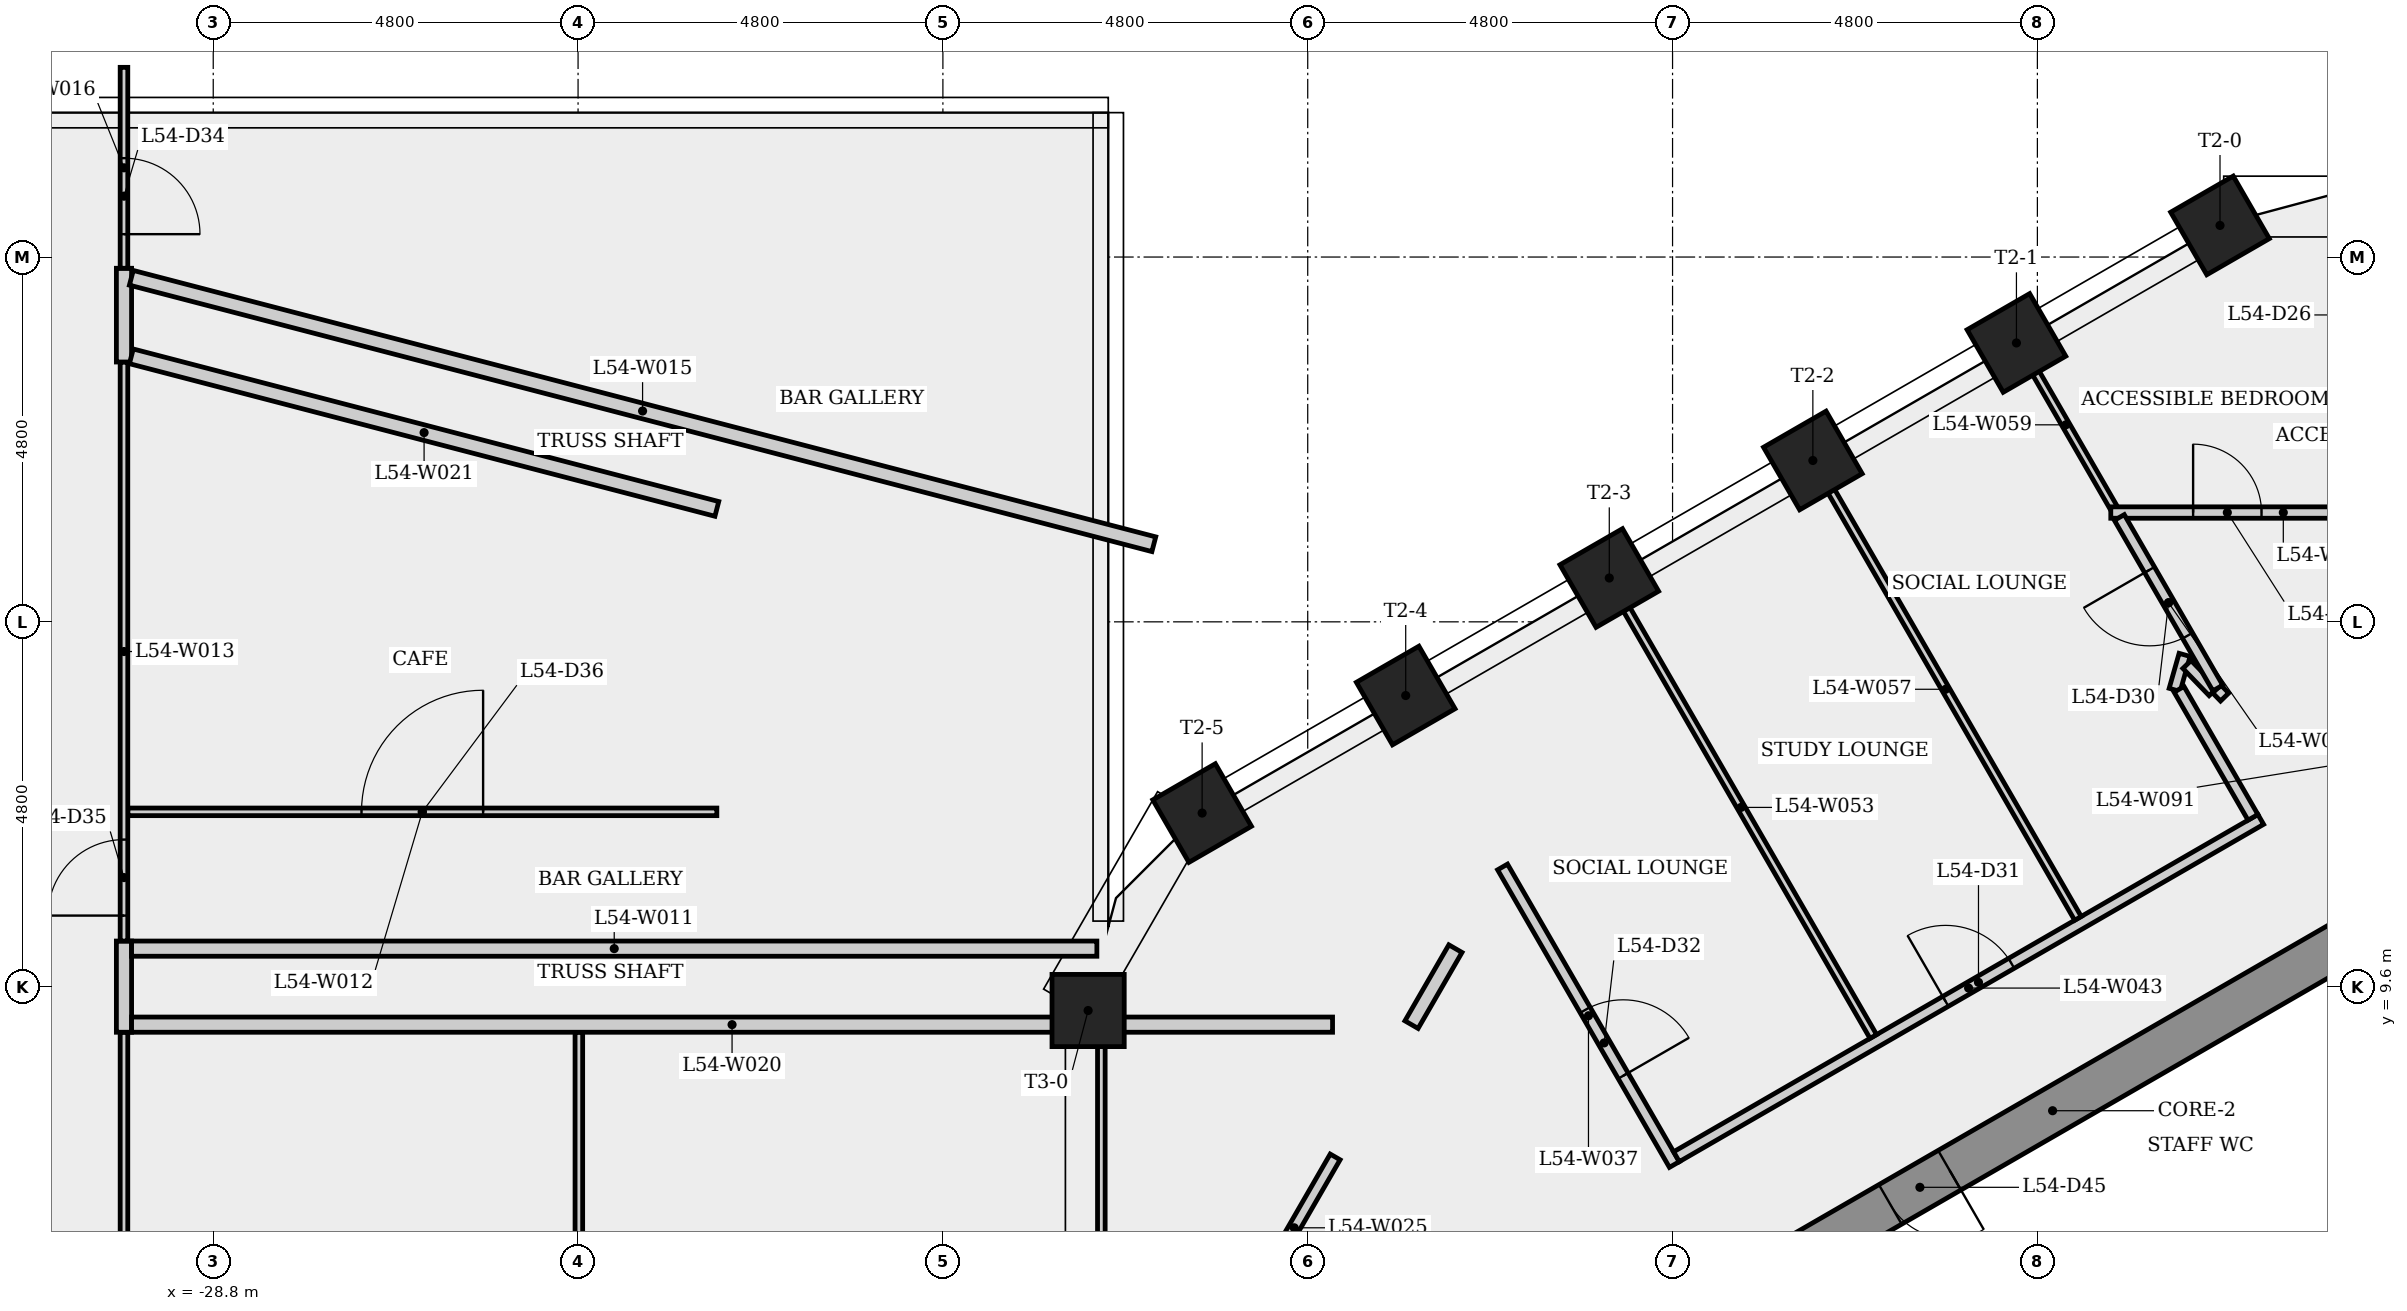
"""IFC4 building model, lengths in metres.
Left out: names, types, materials, properties, quantities, classifications, styles, units other than length and angle.
Written with IfcOpenShell. Run it as: python <this file> out.ifc"""

import sys

from ifc_helpers import new_model, si_unit, direction, frame, frame_2d, origin, origin_2d, place, context, subcontext, project, spatial, rectangle, extrude, element, fill, save


model = new_model("IFC4")
c1 = context("Model", 3, precision=1e-05, world=origin(), true_north=direction((0.0, 1.0)))
c2 = subcontext(c1, "Body", "Model", "MODEL_VIEW")
j1 = project(units=[si_unit("LENGTHUNIT", "METRE"), si_unit("PLANEANGLEUNIT", "RADIAN")], contexts=[c1])
p1 = place(None, origin())
s1 = spatial("IfcSite", under=j1, at=p1, CompositionType="ELEMENT")
p2 = place(p1, origin())
s2 = spatial("IfcBuilding", under=s1, at=p2, CompositionType="ELEMENT")
p3 = place(p2, frame((0.0, 0.0, 202.1)))
s3 = spatial("IfcBuildingStorey", under=s2, at=p3, CompositionType="ELEMENT", Elevation=202.1)
p4 = place(p3, frame((0.15, 10.71, 0.0), z_axis=(0.0, 0.0, 1.0), x_axis=(-0.866023993627, -0.500002442456, 0.0)))
e1 = element("IfcWall", 1, at=p4, inside=s3, PredefinedType="SHEAR", context=c2, shape_type="SweptSolid", body=[
    extrude(rectangle(XDim=10.97, YDim=0.6, at=frame_2d((5.485, 0.0))), origin(), (0.0, 0.0, 1.0), 4.0),
])
p5 = place(p4, frame((7.05, 0.0, 0.0)))
e2 = element("IfcOpeningElement", 2, at=p5, cuts=e1, PredefinedType="OPENING", context=c2, shape_type="SweptSolid", body=[
    extrude(rectangle(XDim=0.9, YDim=2.1, at=frame_2d((0.45, 1.05))), frame((0.0, 0.31, 0.0), z_axis=(0.0, -1.0, 0.0), x_axis=(1.0, 0.0, 0.0)), (0.0, 0.0, 1.0), 0.62),
])
for number, where, z_axis, x_axis in (
    (3, (-2.397, 19.616, 0.0), (0.0, 0.0, 1.0), (-0.5, 0.866, 0.0)),
    (4, (-5.076, 18.07, 0.0), (0.0, 0.0, 1.0), (-0.5, 0.866, 0.0)),
    (5, (-7.754, 16.523, 0.0), (0.0, 0.0, 1.0), (-0.5, 0.866, 0.0)),
    (6, (-10.432, 14.977, 0.0), (0.0, 0.0, 1.0), (-0.5, 0.866, 0.0)),
    (7, (-13.111, 13.43, 0.0), (0.0, 0.0, 1.0), (-0.5, 0.866, 0.0)),
    (8, (-15.789, 11.884, 0.0), (0.0, 0.0, 1.0), (-0.5, 0.866, 0.0)),
    (9, (-17.289, 9.286, 0.0), (0.0, 0.0, 1.0), (-1.0, 0.0, 0.0)),
):
    element("IfcColumn", number, at=place(p3, frame(where, z_axis=z_axis, x_axis=x_axis)), inside=s3, PredefinedType="COLUMN", context=c2, shape_type="SweptSolid", body=[
        extrude(rectangle(XDim=0.95, YDim=0.95, at=origin_2d()), origin(), (0.0, 0.0, 1.0), 4.0),
    ])
p6 = place(p3, frame((-29.974, -4.8, 0.0), z_axis=(0.0, 0.0, 1.0), x_axis=(0.0, 1.0, 0.0)))
e10 = element("IfcWall", 10, at=p6, inside=s3, PredefinedType="PARTITIONING", context=c2, shape_type="SweptSolid", body=[
    extrude(rectangle(XDim=13.8, YDim=0.1, at=frame_2d((6.9, 0.0))), origin(), (0.0, 0.0, 1.0), 3.6),
])
p7 = place(p6, frame((0.335, 0.0, 0.0)))
e11 = element("IfcOpeningElement", 11, at=p7, cuts=e10, PredefinedType="OPENING", context=c2, shape_type="SweptSolid", body=[
    extrude(rectangle(XDim=1.0, YDim=2.1, at=frame_2d((0.5, 1.05))), frame((0.0, 0.06, 0.0), z_axis=(0.0, -1.0, 0.0), x_axis=(1.0, 0.0, 0.0)), (0.0, 0.0, 1.0), 0.12),
])
p8 = place(p6, frame((6.965, 0.0, 0.0)))
e12 = element("IfcOpeningElement", 12, at=p8, cuts=e10, PredefinedType="OPENING", context=c2, shape_type="SweptSolid", body=[
    extrude(rectangle(XDim=1.6, YDim=2.1, at=frame_2d((0.8, 1.05))), frame((0.0, 0.06, 0.0), z_axis=(0.0, -1.0, 0.0), x_axis=(1.0, 0.0, 0.0)), (0.0, 0.0, 1.0), 0.12),
])
p9 = place(p3, frame((-29.974, 9.0, 0.0), z_axis=(0.0, 0.0, 1.0), x_axis=(0.0, 1.0, 0.0)))
e13 = element("IfcWall", 13, at=p9, inside=s3, PredefinedType="PLUMBINGWALL", context=c2, shape_type="SweptSolid", body=[
    extrude(rectangle(XDim=1.2, YDim=0.2, at=frame_2d((0.6, 0.0))), origin(), (0.0, 0.0, 1.0), 3.6),
])
p10 = place(p3, frame((-29.874, 10.1, 0.0), z_axis=(0.0, 0.0, 1.0), x_axis=(1.0, 0.0, 0.0)))
e14 = element("IfcWall", 14, at=p10, inside=s3, PredefinedType="PLUMBINGWALL", context=c2, shape_type="SweptSolid", body=[
    extrude(rectangle(XDim=12.7, YDim=0.2, at=frame_2d((6.35, 0.0))), origin(), (0.0, 0.0, 1.0), 3.6),
])
p11 = place(p3, frame((-29.924, 11.9, 0.0), z_axis=(0.0, 0.0, 1.0), x_axis=(1.0, 0.0, 0.0)))
e15 = element("IfcWall", 15, at=p11, inside=s3, PredefinedType="PARTITIONING", context=c2, shape_type="SweptSolid", body=[
    extrude(rectangle(XDim=7.75, YDim=0.1, at=frame_2d((3.875, 0.0))), origin(), (0.0, 0.0, 1.0), 3.6),
])
p12 = place(p11, frame((3.075, 0.0, 0.0)))
e16 = element("IfcOpeningElement", 16, at=p12, cuts=e15, PredefinedType="OPENING", context=c2, shape_type="SweptSolid", body=[
    extrude(rectangle(XDim=1.6, YDim=2.1, at=frame_2d((0.8, 1.05))), frame((0.0, 0.06, 0.0), z_axis=(0.0, -1.0, 0.0), x_axis=(1.0, 0.0, 0.0)), (0.0, 0.0, 1.0), 0.12),
])
p13 = place(p3, frame((-29.974, 10.2, 0.0), z_axis=(0.0, 0.0, 1.0), x_axis=(0.0, 1.0, 0.0)))
e17 = element("IfcWall", 17, at=p13, inside=s3, PredefinedType="PARTITIONING", context=c2, shape_type="SweptSolid", body=[
    extrude(rectangle(XDim=7.619, YDim=0.1, at=frame_2d((3.81, 0.0))), origin(), (0.0, 0.0, 1.0), 3.6),
])
p14 = place(p13, frame((0.335, 0.0, 0.0)))
e18 = element("IfcOpeningElement", 18, at=p14, cuts=e17, PredefinedType="OPENING", context=c2, shape_type="SweptSolid", body=[
    extrude(rectangle(XDim=1.0, YDim=2.1, at=frame_2d((0.5, 1.05))), frame((0.0, 0.06, 0.0), z_axis=(0.0, -1.0, 0.0), x_axis=(1.0, 0.0, 0.0)), (0.0, 0.0, 1.0), 0.12),
])
p15 = place(p3, frame((-29.974, 17.819, 0.0), z_axis=(0.0, 0.0, 1.0), x_axis=(0.0, 1.0, 0.0)))
e19 = element("IfcWall", 19, at=p15, inside=s3, PredefinedType="PLUMBINGWALL", context=c2, shape_type="SweptSolid", body=[
    extrude(rectangle(XDim=1.233, YDim=0.2, at=frame_2d((0.617, 0.0))), origin(), (0.0, 0.0, 1.0), 3.6),
])
p16 = place(p3, frame((-29.877, 18.927, 0.0), z_axis=(0.0, 0.0, 1.0), x_axis=(0.967683445077, -0.252168098941, 0.0)))
e20 = element("IfcWall", 20, at=p16, inside=s3, PredefinedType="PLUMBINGWALL", context=c2, shape_type="SweptSolid", body=[
    extrude(rectangle(XDim=13.902, YDim=0.2, at=frame_2d((6.951, 0.0))), origin(), (0.0, 0.0, 1.0), 3.6),
])
p17 = place(p3, frame((-29.974, 21.696, 0.0), z_axis=(0.0, 0.0, 1.0), x_axis=(0.0, -1.0, 0.0)))
e21 = element("IfcWall", 21, at=p17, inside=s3, PredefinedType="PARTITIONING", context=c2, shape_type="SweptSolid", body=[
    extrude(rectangle(XDim=2.644, YDim=0.1, at=frame_2d((1.322, 0.0))), origin(), (0.0, 0.0, 1.0), 3.6),
])
p18 = place(p17, frame((1.195, 0.0, 0.0)))
e22 = element("IfcOpeningElement", 22, at=p18, cuts=e21, PredefinedType="OPENING", context=c2, shape_type="SweptSolid", body=[
    extrude(rectangle(XDim=1.0, YDim=2.1, at=frame_2d((0.5, 1.05))), frame((0.0, 0.06, 0.0), z_axis=(0.0, -1.0, 0.0), x_axis=(1.0, 0.0, 0.0)), (0.0, 0.0, 1.0), 0.12),
])
p19 = place(p3, frame((-23.99, -3.05, 0.0), z_axis=(0.0, 0.0, 1.0), x_axis=(0.0, 1.0, 0.0)))
e23 = element("IfcWall", 23, at=p19, inside=s3, PredefinedType="PARTITIONING", context=c2, shape_type="SweptSolid", body=[
    extrude(rectangle(XDim=12.05, YDim=0.1, at=frame_2d((6.025, 0.0))), origin(), (0.0, 0.0, 1.0), 3.6),
])
p20 = place(p3, frame((-29.874, 9.1, 0.0), z_axis=(0.0, 0.0, 1.0), x_axis=(1.0, 0.0, 0.0)))
e24 = element("IfcWall", 24, at=p20, inside=s3, PredefinedType="PLUMBINGWALL", context=c2, shape_type="SweptSolid", body=[
    extrude(rectangle(XDim=15.801, YDim=0.2, at=frame_2d((7.9, 0.0))), origin(), (0.0, 0.0, 1.0), 3.6),
])
p21 = place(p3, frame((-22.174, 15.886, 0.0), z_axis=(0.0, 0.0, 1.0), x_axis=(-0.967676846945, 0.25219341761, 0.0)))
e25 = element("IfcWall", 25, at=p21, inside=s3, PredefinedType="PLUMBINGWALL", context=c2, shape_type="SweptSolid", body=[
    extrude(rectangle(XDim=7.96, YDim=0.2, at=frame_2d((3.98, 0.0))), origin(), (0.0, 0.0, 1.0), 3.6),
])
p22 = place(p3, frame((-17.115, -3.05, 0.0), z_axis=(0.0, 0.0, 1.0), x_axis=(0.0, 1.0, 0.0)))
e26 = element("IfcWall", 26, at=p22, inside=s3, PredefinedType="PARTITIONING", context=c2, shape_type="SweptSolid", body=[
    extrude(rectangle(XDim=12.05, YDim=0.1, at=frame_2d((6.025, 0.0))), origin(), (0.0, 0.0, 1.0), 2.775),
])
p23 = place(p3, frame((-15.116, 5.494, 0.0), z_axis=(0.0, 0.0, 1.0), x_axis=(0.499918713684, 0.866072329375, 0.0)))
e27 = element("IfcWall", 27, at=p23, inside=s3, PredefinedType="PARTITIONING", context=c2, shape_type="SweptSolid", body=[
    extrude(rectangle(XDim=2.154, YDim=0.15, at=frame_2d((1.077, 0.0))), origin(), (0.0, 0.0, 1.0), 3.6),
])
p24 = place(p3, frame((-13.034, 9.1, 0.0), z_axis=(0.0, 0.0, 1.0), x_axis=(0.500094469721, 0.865970854795, 0.0)))
e28 = element("IfcWall", 28, at=p24, inside=s3, PredefinedType="PLUMBINGWALL", context=c2, shape_type="SweptSolid", body=[
    extrude(rectangle(XDim=1.155, YDim=0.2, at=frame_2d((0.578, 0.0))), origin(), (0.0, 0.0, 1.0), 3.6),
])
p25 = place(p3, frame((-11.836, 11.175, 0.0), z_axis=(0.0, 0.0, 1.0), x_axis=(0.499960863417, -0.866047998122, 0.0)))
e29 = element("IfcWall", 29, at=p25, inside=s3, PredefinedType="PARTITIONING", context=c2, shape_type="SweptSolid", body=[
    extrude(rectangle(XDim=4.521, YDim=0.15, at=frame_2d((2.26, 0.0))), origin(), (0.0, 0.0, 1.0), 3.6),
])
p26 = place(p25, frame((2.173, 0.0, 0.0)))
e30 = element("IfcOpeningElement", 30, at=p26, cuts=e29, PredefinedType="OPENING", context=c2, shape_type="SweptSolid", body=[
    extrude(rectangle(XDim=1.0, YDim=2.1, at=frame_2d((0.5, 1.05))), frame((0.0, 0.085, 0.0), z_axis=(0.0, -1.0, 0.0), x_axis=(1.0, 0.0, 0.0)), (0.0, 0.0, 1.0), 0.17),
])
p27 = place(p3, frame((-9.549, 7.362, 0.0), z_axis=(0.0, 0.0, 1.0), x_axis=(0.86603261217, 0.499987514502, 0.0)))
e31 = element("IfcWall", 31, at=p27, inside=s3, PredefinedType="PARTITIONING", context=c2, shape_type="SweptSolid", body=[
    extrude(rectangle(XDim=8.877, YDim=0.15, at=frame_2d((4.438, 0.0))), origin(), (0.0, 0.0, 1.0), 3.6),
])
p28 = place(p27, frame((4.088, 0.0, 0.0)))
e32 = element("IfcOpeningElement", 32, at=p28, cuts=e31, PredefinedType="OPENING", context=c2, shape_type="SweptSolid", body=[
    extrude(rectangle(XDim=1.0, YDim=2.1, at=frame_2d((0.5, 1.05))), frame((0.0, 0.085, 0.0), z_axis=(0.0, -1.0, 0.0), x_axis=(1.0, 0.0, 0.0)), (0.0, 0.0, 1.0), 0.17),
])
p29 = place(p3, frame((-6.959, 8.944, 0.0), z_axis=(0.0, 0.0, 1.0), x_axis=(-0.499982511794, 0.866035500369, 0.0)))
e33 = element("IfcWall", 33, at=p29, inside=s3, PredefinedType="PARTITIONING", context=c2, shape_type="SweptSolid", body=[
    extrude(rectangle(XDim=6.962, YDim=0.1, at=frame_2d((3.481, 0.0))), origin(), (0.0, 0.0, 1.0), 3.6),
])
p30 = place(p3, frame((-4.266, 10.498, 0.0), z_axis=(0.0, 0.0, 1.0), x_axis=(-0.499997697262, 0.866026733267, 0.0)))
e34 = element("IfcWall", 34, at=p30, inside=s3, PredefinedType="PARTITIONING", context=c2, shape_type="SweptSolid", body=[
    extrude(rectangle(XDim=6.961, YDim=0.1, at=frame_2d((3.481, 0.0))), origin(), (0.0, 0.0, 1.0), 3.6),
])
p31 = place(p3, frame((-3.797, 15.903, 0.0), z_axis=(0.0, 0.0, 1.0), x_axis=(-0.499980071345, 0.866036909293, 0.0)))
e35 = element("IfcWall", 35, at=p31, inside=s3, PredefinedType="PARTITIONING", context=c2, shape_type="SweptSolid", body=[
    extrude(rectangle(XDim=2.516, YDim=0.1, at=frame_2d((1.258, 0.0))), origin(), (0.0, 0.0, 1.0), 3.6),
])
p32 = place(p3, frame((-3.834, 15.838, 0.0), z_axis=(0.0, 0.0, 1.0), x_axis=(1.0, 0.0, 0.0)))
e36 = element("IfcWall", 36, at=p32, inside=s3, PredefinedType="PARTITIONING", context=c2, shape_type="SweptSolid", body=[
    extrude(rectangle(XDim=4.54, YDim=0.15, at=frame_2d((2.27, 0.0))), origin(), (0.0, 0.0, 1.0), 3.6),
])
p33 = place(p32, frame((1.083, 0.0, 0.0)))
e37 = element("IfcOpeningElement", 37, at=p33, cuts=e36, PredefinedType="OPENING", context=c2, shape_type="SweptSolid", body=[
    extrude(rectangle(XDim=0.9, YDim=2.1, at=frame_2d((0.45, 1.05))), frame((0.0, 0.085, 0.0), z_axis=(0.0, -1.0, 0.0), x_axis=(1.0, 0.0, 0.0)), (0.0, 0.0, 1.0), 0.17),
])
p34 = place(p3, frame((-2.994, 13.505, 0.0), z_axis=(0.0, 0.0, 1.0), x_axis=(0.272901613018, 0.962041947948, 0.0)))
e38 = element("IfcWall", 38, at=p34, inside=s3, PredefinedType="PARTITIONING", context=c2, shape_type="SweptSolid", body=[
    extrude(rectangle(XDim=0.479, YDim=0.15, at=frame_2d((0.239, 0.0))), origin(), (0.0, 0.0, 1.0), 3.6),
])
p35 = place(p3, frame((-2.832, 13.839, 0.0), z_axis=(0.0, 0.0, 1.0), x_axis=(0.693981147863, -0.719993171086, 0.0)))
e39 = element("IfcWall", 39, at=p35, inside=s3, PredefinedType="PARTITIONING", context=c2, shape_type="SweptSolid", body=[
    extrude(rectangle(XDim=0.498, YDim=0.15, at=frame_2d((0.249, 0.0))), origin(), (0.0, 0.0, 1.0), 3.6),
])
p36 = place(p3, frame((-2.44, 13.516, 0.0), z_axis=(0.0, 0.0, 1.0), x_axis=(0.697973238533, -0.716123842845, 0.0)))
e40 = element("IfcWall", 40, at=p36, inside=s3, PredefinedType="PARTITIONING", context=c2, shape_type="SweptSolid", body=[
    extrude(rectangle(XDim=0.148, YDim=0.15, at=frame_2d((0.074, 0.0))), origin(), (0.0, 0.0, 1.0), 3.6),
])
p37 = place(p3, frame((-2.426, 13.529, 0.0), z_axis=(0.0, 0.0, 1.0), x_axis=(-0.49996987118, 0.866042797968, 0.0)))
e41 = element("IfcWall", 41, at=p37, inside=s3, PredefinedType="PARTITIONING", context=c2, shape_type="SweptSolid", body=[
    extrude(rectangle(XDim=2.591, YDim=0.15, at=frame_2d((1.295, 0.0))), origin(), (0.0, 0.0, 1.0), 3.6),
])
p38 = place(p37, frame((0.795, 0.0, 0.0)))
e42 = element("IfcOpeningElement", 42, at=p38, cuts=e41, PredefinedType="OPENING", context=c2, shape_type="SweptSolid", body=[
    extrude(rectangle(XDim=1.0, YDim=2.1, at=frame_2d((0.5, 1.05))), frame((0.0, 0.085, 0.0), z_axis=(0.0, -1.0, 0.0), x_axis=(1.0, 0.0, 0.0)), (0.0, 0.0, 1.0), 0.17),
])
p39 = place(p3, frame((-1.964, 11.828, 0.0), z_axis=(0.0, 0.0, 1.0), x_axis=(-0.499986865671, 0.86603298676, 0.0)))
e43 = element("IfcWall", 43, at=p39, inside=s3, PredefinedType="PARTITIONING", context=c2, shape_type="SweptSolid", body=[
    extrude(rectangle(XDim=1.945, YDim=0.15, at=frame_2d((0.972, 0.0))), origin(), (0.0, 0.0, 1.0), 3.6),
])
p40 = place(p33, origin())
e44 = element("IfcDoor", 44, at=p40, inside=s3, OperationType="SINGLE_SWING_LEFT", PredefinedType="DOOR", context=c2, shape_type="SweptSolid", body=[
    extrude(rectangle(XDim=0.9, YDim=2.1, at=frame_2d((0.45, 1.05))), frame((0.0, 0.025, 0.0), z_axis=(0.0, -1.0, 0.0), x_axis=(1.0, 0.0, 0.0)), (0.0, 0.0, 1.0), 0.05),
])
fill(e37, e44)
p41 = place(p38, origin())
e45 = element("IfcDoor", 45, at=p41, inside=s3, OperationType="SINGLE_SWING_RIGHT", PredefinedType="DOOR", context=c2, shape_type="SweptSolid", body=[
    extrude(rectangle(XDim=1.0, YDim=2.1, at=frame_2d((0.5, 1.05))), frame((0.0, 0.025, 0.0), z_axis=(0.0, -1.0, 0.0), x_axis=(1.0, 0.0, 0.0)), (0.0, 0.0, 1.0), 0.05),
])
fill(e42, e45)
p42 = place(p28, origin())
e46 = element("IfcDoor", 46, at=p42, inside=s3, OperationType="SINGLE_SWING_LEFT", PredefinedType="DOOR", context=c2, shape_type="SweptSolid", body=[
    extrude(rectangle(XDim=1.0, YDim=2.1, at=frame_2d((0.5, 1.05))), frame((0.0, 0.025, 0.0), z_axis=(0.0, -1.0, 0.0), x_axis=(1.0, 0.0, 0.0)), (0.0, 0.0, 1.0), 0.05),
])
fill(e32, e46)
p43 = place(p26, origin())
e47 = element("IfcDoor", 47, at=p43, inside=s3, OperationType="SINGLE_SWING_RIGHT", PredefinedType="DOOR", context=c2, shape_type="SweptSolid", body=[
    extrude(rectangle(XDim=1.0, YDim=2.1, at=frame_2d((0.5, 1.05))), frame((0.0, 0.025, 0.0), z_axis=(0.0, -1.0, 0.0), x_axis=(1.0, 0.0, 0.0)), (0.0, 0.0, 1.0), 0.05),
])
fill(e30, e47)
p44 = place(p18, origin())
e48 = element("IfcDoor", 48, at=p44, inside=s3, OperationType="SINGLE_SWING_RIGHT", PredefinedType="DOOR", context=c2, shape_type="SweptSolid", body=[
    extrude(rectangle(XDim=1.0, YDim=2.1, at=frame_2d((0.5, 1.05))), frame((0.0, 0.025, 0.0), z_axis=(0.0, -1.0, 0.0), x_axis=(1.0, 0.0, 0.0)), (0.0, 0.0, 1.0), 0.05),
])
fill(e22, e48)
p45 = place(p14, origin())
e49 = element("IfcDoor", 49, at=p45, inside=s3, OperationType="SINGLE_SWING_LEFT", PredefinedType="DOOR", context=c2, shape_type="SweptSolid", body=[
    extrude(rectangle(XDim=1.0, YDim=2.1, at=frame_2d((0.5, 1.05))), frame((0.0, 0.025, 0.0), z_axis=(0.0, -1.0, 0.0), x_axis=(1.0, 0.0, 0.0)), (0.0, 0.0, 1.0), 0.05),
])
fill(e18, e49)
p46 = place(p12, origin())
e50 = element("IfcDoor", 50, at=p46, inside=s3, OperationType="SINGLE_SWING_RIGHT", PredefinedType="DOOR", context=c2, shape_type="SweptSolid", body=[
    extrude(rectangle(XDim=1.6, YDim=2.1, at=frame_2d((0.8, 1.05))), frame((0.0, 0.025, 0.0), z_axis=(0.0, -1.0, 0.0), x_axis=(1.0, 0.0, 0.0)), (0.0, 0.0, 1.0), 0.05),
])
fill(e16, e50)
p47 = place(p5, origin())
e51 = element("IfcDoor", 51, at=p47, inside=s3, OperationType="SINGLE_SWING_LEFT", PredefinedType="DOOR", context=c2, shape_type="SweptSolid", body=[
    extrude(rectangle(XDim=0.9, YDim=2.1, at=frame_2d((0.45, 1.05))), frame((0.0, 0.025, 0.0), z_axis=(0.0, -1.0, 0.0), x_axis=(1.0, 0.0, 0.0)), (0.0, 0.0, 1.0), 0.05),
])
fill(e2, e51)
save(model, sys.argv[1])
